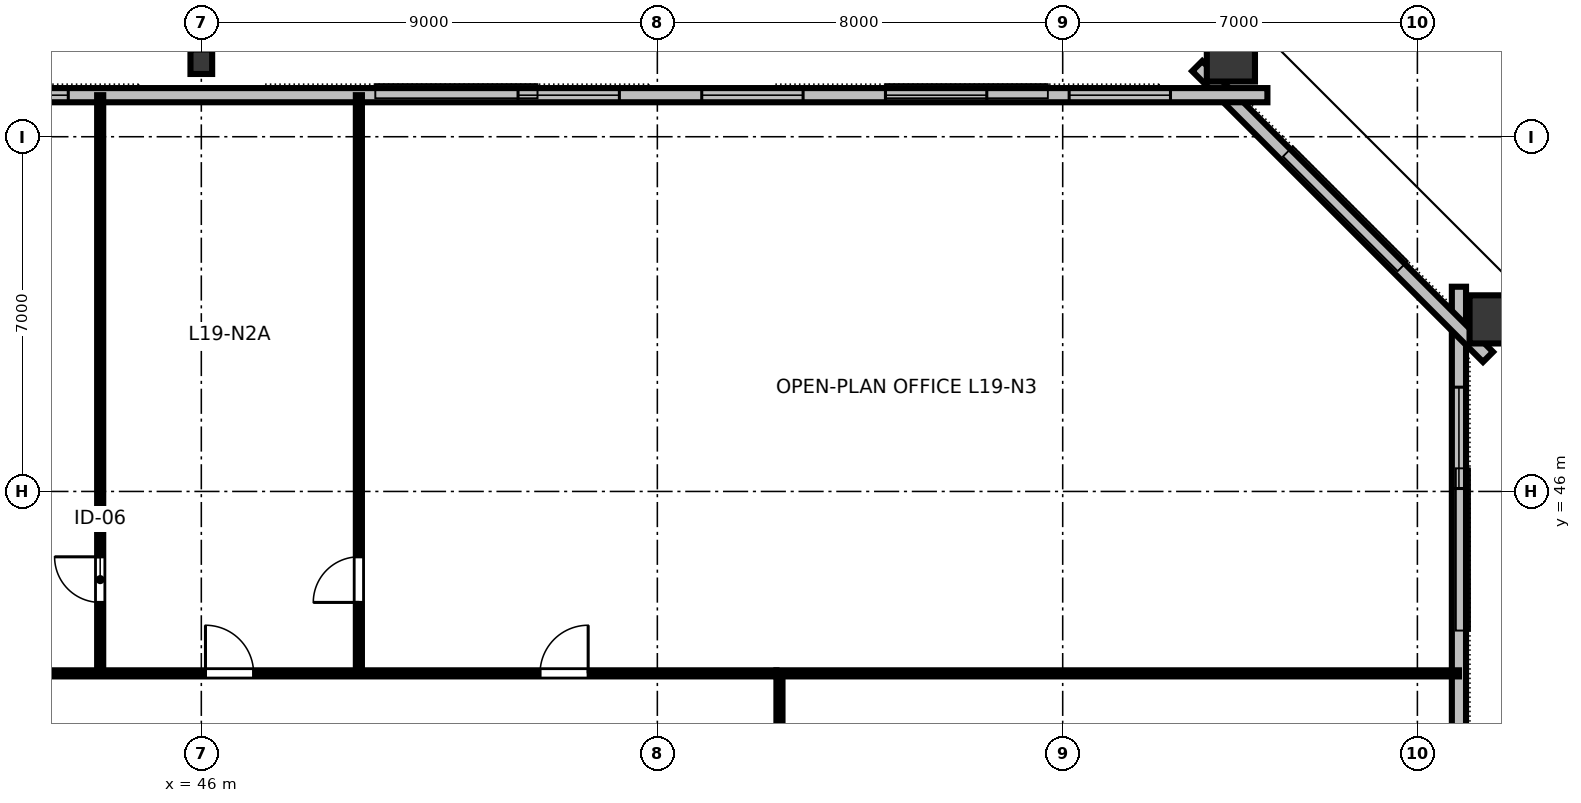
"""IFC4 building model, lengths in metres.
Left out: names, types, materials, properties, quantities, classifications, styles, units other than length and angle.
Written with IfcOpenShell. Run it as: python <this file> out.ifc"""

import sys

from ifc_helpers import new_model, si_unit, direction, frame, frame_2d, origin, origin_2d, place, context, subcontext, project, spatial, rectangle, hollow_rectangle, i_section, extrude, element, fill, save


model = new_model("IFC4")
c1 = context("Model", 3, precision=1e-05, world=origin(), true_north=direction((0.0, 1.0)))
c2 = subcontext(c1, "Body", "Model", "MODEL_VIEW")
j1 = project(units=[si_unit("LENGTHUNIT", "METRE"), si_unit("PLANEANGLEUNIT", "RADIAN")], contexts=[c1])
p1 = place(None, origin())
s1 = spatial("IfcSite", under=j1, at=p1, CompositionType="ELEMENT")
p2 = place(p1, origin())
s2 = spatial("IfcBuilding", under=s1, at=p2, CompositionType="ELEMENT")
p3 = place(p2, frame((0.0, 0.0, 74.8)))
s3 = spatial("IfcBuildingStorey", under=s2, at=p3, CompositionType="ELEMENT", Elevation=74.8)
for number, where, z_axis, x_axis in (
    (1, (71.604, 49.396, 0.0), (0.0, 0.0, 1.0), (0.0, 1.0, 0.0)),
    (2, (66.319, 54.664, 0.0), (0.0, 0.0, 1.0), (1.0, 0.0, 0.0)),
):
    element("IfcColumn", number, at=place(p3, frame(where, z_axis=z_axis, x_axis=x_axis)), inside=s3, PredefinedType="COLUMN", context=c2, shape_type="SweptSolid", body=[
        extrude(hollow_rectangle(XDim=0.95, YDim=1.15, WallThickness=0.06, at=origin_2d()), origin(), (0.0, 0.0, 1.0), 3.358),
    ])
p4 = place(p3, frame((46.0, 54.48, 0.0), z_axis=(0.0, 0.0, 1.0), x_axis=(1.0, 0.0, 0.0)))
e3 = element("IfcColumn", 3, at=p4, inside=s3, PredefinedType="COLUMN", context=c2, shape_type="SweptSolid", body=[
    extrude(i_section(OverallWidth=0.428, OverallDepth=0.483, WebThickness=0.051, FlangeThickness=0.082, FilletRadius=0.025, at=origin_2d()), origin(), (0.0, 0.0, 1.0), 3.358),
])
p5 = place(p3, frame((70.82, 13.96, 0.0), z_axis=(0.0, 0.0, 1.0), x_axis=(0.0, 1.0, 0.0)))
e4 = element("IfcWall", 4, at=p5, inside=s3, PredefinedType="STANDARD", context=c2, shape_type="SweptSolid", body=[
    extrude(rectangle(XDim=36.08, YDim=0.28, at=frame_2d((18.04, 0.0))), origin(), (0.0, 0.0, 1.0), 3.36),
])
p6 = place(p5, frame((1.982, 0.0, 0.8)))
e5 = element("IfcOpeningElement", 5, at=p6, cuts=e4, PredefinedType="OPENING", context=c2, shape_type="SweptSolid", body=[
    extrude(rectangle(XDim=2.0, YDim=1.95, at=frame_2d((1.0, 0.975))), frame((0.0, 0.15, 0.0), z_axis=(0.0, -1.0, 0.0), x_axis=(1.0, 0.0, 0.0)), (0.0, 0.0, 1.0), 0.3),
])
p7 = place(p5, frame((9.511, 0.0, 0.8)))
e6 = element("IfcOpeningElement", 6, at=p7, cuts=e4, PredefinedType="OPENING", context=c2, shape_type="SweptSolid", body=[
    extrude(rectangle(XDim=2.0, YDim=1.95, at=frame_2d((1.0, 0.975))), frame((0.0, 0.15, 0.0), z_axis=(0.0, -1.0, 0.0), x_axis=(1.0, 0.0, 0.0)), (0.0, 0.0, 1.0), 0.3),
])
p8 = place(p5, frame((13.276, 0.0, 0.8)))
e7 = element("IfcOpeningElement", 7, at=p8, cuts=e4, PredefinedType="OPENING", context=c2, shape_type="SweptSolid", body=[
    extrude(rectangle(XDim=2.0, YDim=1.95, at=frame_2d((1.0, 0.975))), frame((0.0, 0.15, 0.0), z_axis=(0.0, -1.0, 0.0), x_axis=(1.0, 0.0, 0.0)), (0.0, 0.0, 1.0), 0.3),
])
p9 = place(p5, frame((20.804, 0.0, 0.8)))
e8 = element("IfcOpeningElement", 8, at=p9, cuts=e4, PredefinedType="OPENING", context=c2, shape_type="SweptSolid", body=[
    extrude(rectangle(XDim=2.0, YDim=1.95, at=frame_2d((1.0, 0.975))), frame((0.0, 0.15, 0.0), z_axis=(0.0, -1.0, 0.0), x_axis=(1.0, 0.0, 0.0)), (0.0, 0.0, 1.0), 0.3),
])
p10 = place(p5, frame((24.569, 0.0, 0.8)))
e9 = element("IfcOpeningElement", 9, at=p10, cuts=e4, PredefinedType="OPENING", context=c2, shape_type="SweptSolid", body=[
    extrude(rectangle(XDim=2.0, YDim=1.95, at=frame_2d((1.0, 0.975))), frame((0.0, 0.15, 0.0), z_axis=(0.0, -1.0, 0.0), x_axis=(1.0, 0.0, 0.0)), (0.0, 0.0, 1.0), 0.3),
])
p11 = place(p5, frame((32.098, 0.0, 0.8)))
e10 = element("IfcOpeningElement", 10, at=p11, cuts=e4, PredefinedType="OPENING", context=c2, shape_type="SweptSolid", body=[
    extrude(rectangle(XDim=2.0, YDim=1.95, at=frame_2d((1.0, 0.975))), frame((0.0, 0.15, 0.0), z_axis=(0.0, -1.0, 0.0), x_axis=(1.0, 0.0, 0.0)), (0.0, 0.0, 1.0), 0.3),
])
p12 = place(p3, frame((71.394, 48.655, 0.0), z_axis=(0.0, 0.0, 1.0), x_axis=(-0.707106781187, 0.707106781187, 0.0)))
e11 = element("IfcWall", 11, at=p12, inside=s3, PredefinedType="STANDARD", context=c2, shape_type="SweptSolid", body=[
    extrude(rectangle(XDim=8.116, YDim=0.28, at=frame_2d((4.058, 0.0))), origin(), (0.0, 0.0, 1.0), 3.36),
])
p13 = place(p3, frame((67.04, 53.82, 0.0), z_axis=(0.0, 0.0, 1.0), x_axis=(-1.0, 0.0, 0.0)))
e12 = element("IfcWall", 12, at=p13, inside=s3, PredefinedType="STANDARD", context=c2, shape_type="SweptSolid", body=[
    extrude(rectangle(XDim=42.08, YDim=0.28, at=frame_2d((21.04, 0.0))), origin(), (0.0, 0.0, 1.0), 3.36),
])
p14 = place(p13, frame((1.913, 0.0, 0.8)))
e13 = element("IfcOpeningElement", 13, at=p14, cuts=e12, PredefinedType="OPENING", context=c2, shape_type="SweptSolid", body=[
    extrude(rectangle(XDim=2.0, YDim=1.95, at=frame_2d((1.0, 0.975))), frame((0.0, 0.15, 0.0), z_axis=(0.0, -1.0, 0.0), x_axis=(1.0, 0.0, 0.0)), (0.0, 0.0, 1.0), 0.3),
])
p15 = place(p13, frame((5.538, 0.0, 0.8)))
e14 = element("IfcOpeningElement", 14, at=p15, cuts=e12, PredefinedType="OPENING", context=c2, shape_type="SweptSolid", body=[
    extrude(rectangle(XDim=2.0, YDim=1.95, at=frame_2d((1.0, 0.975))), frame((0.0, 0.15, 0.0), z_axis=(0.0, -1.0, 0.0), x_axis=(1.0, 0.0, 0.0)), (0.0, 0.0, 1.0), 0.3),
])
p16 = place(p13, frame((9.164, 0.0, 0.8)))
e15 = element("IfcOpeningElement", 15, at=p16, cuts=e12, PredefinedType="OPENING", context=c2, shape_type="SweptSolid", body=[
    extrude(rectangle(XDim=2.0, YDim=1.95, at=frame_2d((1.0, 0.975))), frame((0.0, 0.15, 0.0), z_axis=(0.0, -1.0, 0.0), x_axis=(1.0, 0.0, 0.0)), (0.0, 0.0, 1.0), 0.3),
])
p17 = place(p13, frame((12.789, 0.0, 0.8)))
e16 = element("IfcOpeningElement", 16, at=p17, cuts=e12, PredefinedType="OPENING", context=c2, shape_type="SweptSolid", body=[
    extrude(rectangle(XDim=2.0, YDim=1.95, at=frame_2d((1.0, 0.975))), frame((0.0, 0.15, 0.0), z_axis=(0.0, -1.0, 0.0), x_axis=(1.0, 0.0, 0.0)), (0.0, 0.0, 1.0), 0.3),
])
p18 = place(p13, frame((23.666, 0.0, 0.8)))
e17 = element("IfcOpeningElement", 17, at=p18, cuts=e12, PredefinedType="OPENING", context=c2, shape_type="SweptSolid", body=[
    extrude(rectangle(XDim=2.0, YDim=1.95, at=frame_2d((1.0, 0.975))), frame((0.0, 0.15, 0.0), z_axis=(0.0, -1.0, 0.0), x_axis=(1.0, 0.0, 0.0)), (0.0, 0.0, 1.0), 0.3),
])
p19 = place(p13, frame((27.291, 0.0, 0.8)))
e18 = element("IfcOpeningElement", 18, at=p19, cuts=e12, PredefinedType="OPENING", context=c2, shape_type="SweptSolid", body=[
    extrude(rectangle(XDim=2.0, YDim=1.95, at=frame_2d((1.0, 0.975))), frame((0.0, 0.15, 0.0), z_axis=(0.0, -1.0, 0.0), x_axis=(1.0, 0.0, 0.0)), (0.0, 0.0, 1.0), 0.3),
])
p20 = place(p13, frame((30.917, 0.0, 0.8)))
e19 = element("IfcOpeningElement", 19, at=p20, cuts=e12, PredefinedType="OPENING", context=c2, shape_type="SweptSolid", body=[
    extrude(rectangle(XDim=2.0, YDim=1.95, at=frame_2d((1.0, 0.975))), frame((0.0, 0.15, 0.0), z_axis=(0.0, -1.0, 0.0), x_axis=(1.0, 0.0, 0.0)), (0.0, 0.0, 1.0), 0.3),
])
p21 = place(p13, frame((34.542, 0.0, 0.8)))
e20 = element("IfcOpeningElement", 20, at=p21, cuts=e12, PredefinedType="OPENING", context=c2, shape_type="SweptSolid", body=[
    extrude(rectangle(XDim=2.0, YDim=1.95, at=frame_2d((1.0, 0.975))), frame((0.0, 0.15, 0.0), z_axis=(0.0, -1.0, 0.0), x_axis=(1.0, 0.0, 0.0)), (0.0, 0.0, 1.0), 0.3),
])
p22 = place(p13, frame((38.167, 0.0, 0.8)))
e21 = element("IfcOpeningElement", 21, at=p22, cuts=e12, PredefinedType="OPENING", context=c2, shape_type="SweptSolid", body=[
    extrude(rectangle(XDim=2.0, YDim=1.95, at=frame_2d((1.0, 0.975))), frame((0.0, 0.15, 0.0), z_axis=(0.0, -1.0, 0.0), x_axis=(1.0, 0.0, 0.0)), (0.0, 0.0, 1.0), 0.3),
])
p23 = place(p3, frame((44.004, 42.41, 0.0), z_axis=(0.0, 0.0, 1.0), x_axis=(0.0, 1.0, 0.0)))
e22 = element("IfcWall", 22, at=p23, inside=s3, PredefinedType="PARTITIONING", context=c2, shape_type="SweptSolid", body=[
    extrude(rectangle(XDim=11.41, YDim=0.12, at=frame_2d((5.705, 0.0))), origin(), (0.0, 0.0, 1.0), 2.64),
])
p24 = place(p23, frame((1.4, 0.0, 0.0)))
e23 = element("IfcOpeningElement", 23, at=p24, cuts=e22, PredefinedType="OPENING", context=c2, shape_type="SweptSolid", body=[
    extrude(rectangle(XDim=0.9, YDim=2.15, at=frame_2d((0.45, 1.075))), frame((0.0, 0.07, 0.0), z_axis=(0.0, -1.0, 0.0), x_axis=(1.0, 0.0, 0.0)), (0.0, 0.0, 1.0), 0.14),
])
p25 = place(p3, frame((49.11, 42.41, 0.0), z_axis=(0.0, 0.0, 1.0), x_axis=(0.0, 1.0, 0.0)))
e24 = element("IfcWall", 24, at=p25, inside=s3, PredefinedType="PARTITIONING", context=c2, shape_type="SweptSolid", body=[
    extrude(rectangle(XDim=11.41, YDim=0.12, at=frame_2d((5.705, 0.0))), origin(), (0.0, 0.0, 1.0), 2.64),
])
p26 = place(p25, frame((1.4, 0.0, 0.0)))
e25 = element("IfcOpeningElement", 25, at=p26, cuts=e24, PredefinedType="OPENING", context=c2, shape_type="SweptSolid", body=[
    extrude(rectangle(XDim=0.9, YDim=2.15, at=frame_2d((0.45, 1.075))), frame((0.0, 0.07, 0.0), z_axis=(0.0, -1.0, 0.0), x_axis=(1.0, 0.0, 0.0)), (0.0, 0.0, 1.0), 0.14),
])
p27 = place(p3, frame((34.65, 42.41, 0.0), z_axis=(0.0, 0.0, 1.0), x_axis=(1.0, 0.0, 0.0)))
e26 = element("IfcWall", 26, at=p27, inside=s3, PredefinedType="PARTITIONING", context=c2, shape_type="SweptSolid", body=[
    extrude(rectangle(XDim=22.7, YDim=0.12, at=frame_2d((11.35, 0.0))), origin(), (0.0, 0.0, 1.0), 2.64),
])
p28 = place(p27, frame((4.272, 0.0, 0.0)))
e27 = element("IfcOpeningElement", 27, at=p28, cuts=e26, PredefinedType="OPENING", context=c2, shape_type="SweptSolid", body=[
    extrude(rectangle(XDim=0.95, YDim=2.15, at=frame_2d((0.475, 1.075))), frame((0.0, 0.07, 0.0), z_axis=(0.0, -1.0, 0.0), x_axis=(1.0, 0.0, 0.0)), (0.0, 0.0, 1.0), 0.14),
])
p29 = place(p27, frame((11.432, 0.0, 0.0)))
e28 = element("IfcOpeningElement", 28, at=p29, cuts=e26, PredefinedType="OPENING", context=c2, shape_type="SweptSolid", body=[
    extrude(rectangle(XDim=0.95, YDim=2.15, at=frame_2d((0.475, 1.075))), frame((0.0, 0.07, 0.0), z_axis=(0.0, -1.0, 0.0), x_axis=(1.0, 0.0, 0.0)), (0.0, 0.0, 1.0), 0.14),
])
p30 = place(p27, frame((18.035, 0.0, 0.0)))
e29 = element("IfcOpeningElement", 29, at=p30, cuts=e26, PredefinedType="OPENING", context=c2, shape_type="SweptSolid", body=[
    extrude(rectangle(XDim=0.95, YDim=2.15, at=frame_2d((0.475, 1.075))), frame((0.0, 0.07, 0.0), z_axis=(0.0, -1.0, 0.0), x_axis=(1.0, 0.0, 0.0)), (0.0, 0.0, 1.0), 0.14),
])
p31 = place(p3, frame((57.41, 21.65, 0.0), z_axis=(0.0, 0.0, 1.0), x_axis=(0.0, 1.0, 0.0)))
e30 = element("IfcWall", 30, at=p31, inside=s3, PredefinedType="PARTITIONING", context=c2, shape_type="SweptSolid", body=[
    extrude(rectangle(XDim=20.7, YDim=0.12, at=frame_2d((10.35, 0.0))), origin(), (0.0, 0.0, 1.0), 2.64),
])
p32 = place(p31, frame((4.931, 0.0, 0.0)))
e31 = element("IfcOpeningElement", 31, at=p32, cuts=e30, PredefinedType="OPENING", context=c2, shape_type="SweptSolid", body=[
    extrude(rectangle(XDim=0.95, YDim=2.15, at=frame_2d((0.475, 1.075))), frame((0.0, 0.07, 0.0), z_axis=(0.0, -1.0, 0.0), x_axis=(1.0, 0.0, 0.0)), (0.0, 0.0, 1.0), 0.14),
])
p33 = place(p31, frame((15.081, 0.0, 0.0)))
e32 = element("IfcOpeningElement", 32, at=p33, cuts=e30, PredefinedType="OPENING", context=c2, shape_type="SweptSolid", body=[
    extrude(rectangle(XDim=0.95, YDim=2.15, at=frame_2d((0.475, 1.075))), frame((0.0, 0.07, 0.0), z_axis=(0.0, -1.0, 0.0), x_axis=(1.0, 0.0, 0.0)), (0.0, 0.0, 1.0), 0.14),
])
p34 = place(p3, frame((57.35, 42.41, 0.0), z_axis=(0.0, 0.0, 1.0), x_axis=(1.0, 0.0, 0.0)))
e33 = element("IfcWall", 33, at=p34, inside=s3, PredefinedType="PARTITIONING", context=c2, shape_type="SweptSolid", body=[
    extrude(rectangle(XDim=13.47, YDim=0.12, at=frame_2d((6.735, 0.0))), origin(), (0.0, 0.0, 1.0), 2.64),
])
p35 = place(p11, origin())
e34 = element("IfcWindow", 34, at=p35, inside=s3, PartitioningType="SINGLE_PANEL", PredefinedType="WINDOW", context=c2, shape_type="SweptSolid", body=[
    extrude(rectangle(XDim=2.0, YDim=1.95, at=frame_2d((1.0, 0.975))), frame((0.0, 0.03, 0.0), z_axis=(0.0, -1.0, 0.0), x_axis=(1.0, 0.0, 0.0)), (0.0, 0.0, 1.0), 0.06),
])
fill(e10, e34)
p36 = place(p14, origin())
e35 = element("IfcWindow", 35, at=p36, inside=s3, PartitioningType="SINGLE_PANEL", PredefinedType="WINDOW", context=c2, shape_type="SweptSolid", body=[
    extrude(rectangle(XDim=2.0, YDim=1.95, at=frame_2d((1.0, 0.975))), frame((0.0, 0.03, 0.0), z_axis=(0.0, -1.0, 0.0), x_axis=(1.0, 0.0, 0.0)), (0.0, 0.0, 1.0), 0.06),
])
fill(e13, e35)
p37 = place(p15, origin())
e36 = element("IfcWindow", 36, at=p37, inside=s3, PartitioningType="SINGLE_PANEL", PredefinedType="WINDOW", context=c2, shape_type="SweptSolid", body=[
    extrude(rectangle(XDim=2.0, YDim=1.95, at=frame_2d((1.0, 0.975))), frame((0.0, 0.03, 0.0), z_axis=(0.0, -1.0, 0.0), x_axis=(1.0, 0.0, 0.0)), (0.0, 0.0, 1.0), 0.06),
])
fill(e14, e36)
p38 = place(p16, origin())
e37 = element("IfcWindow", 37, at=p38, inside=s3, PartitioningType="SINGLE_PANEL", PredefinedType="WINDOW", context=c2, shape_type="SweptSolid", body=[
    extrude(rectangle(XDim=2.0, YDim=1.95, at=frame_2d((1.0, 0.975))), frame((0.0, 0.03, 0.0), z_axis=(0.0, -1.0, 0.0), x_axis=(1.0, 0.0, 0.0)), (0.0, 0.0, 1.0), 0.06),
])
fill(e15, e37)
p39 = place(p17, origin())
e38 = element("IfcWindow", 38, at=p39, inside=s3, PartitioningType="SINGLE_PANEL", PredefinedType="WINDOW", context=c2, shape_type="SweptSolid", body=[
    extrude(rectangle(XDim=2.0, YDim=1.95, at=frame_2d((1.0, 0.975))), frame((0.0, 0.03, 0.0), z_axis=(0.0, -1.0, 0.0), x_axis=(1.0, 0.0, 0.0)), (0.0, 0.0, 1.0), 0.06),
])
fill(e16, e38)
p40 = place(p18, origin())
e39 = element("IfcWindow", 39, at=p40, inside=s3, PartitioningType="SINGLE_PANEL", PredefinedType="WINDOW", context=c2, shape_type="SweptSolid", body=[
    extrude(rectangle(XDim=2.0, YDim=1.95, at=frame_2d((1.0, 0.975))), frame((0.0, 0.03, 0.0), z_axis=(0.0, -1.0, 0.0), x_axis=(1.0, 0.0, 0.0)), (0.0, 0.0, 1.0), 0.06),
])
fill(e17, e39)
p41 = place(p24, origin())
e40 = element("IfcDoor", 40, at=p41, inside=s3, OperationType="SINGLE_SWING_RIGHT", PredefinedType="DOOR", context=c2, shape_type="SweptSolid", body=[
    extrude(rectangle(XDim=0.9, YDim=2.15, at=frame_2d((0.45, 1.075))), frame((0.0, 0.025, 0.0), z_axis=(0.0, -1.0, 0.0), x_axis=(1.0, 0.0, 0.0)), (0.0, 0.0, 1.0), 0.05),
])
fill(e23, e40)
p42 = place(p26, origin())
e41 = element("IfcDoor", 41, at=p42, inside=s3, OperationType="SINGLE_SWING_LEFT", PredefinedType="DOOR", context=c2, shape_type="SweptSolid", body=[
    extrude(rectangle(XDim=0.9, YDim=2.15, at=frame_2d((0.45, 1.075))), frame((0.0, 0.025, 0.0), z_axis=(0.0, -1.0, 0.0), x_axis=(1.0, 0.0, 0.0)), (0.0, 0.0, 1.0), 0.05),
])
fill(e25, e41)
p43 = place(p29, origin())
e42 = element("IfcDoor", 42, at=p43, inside=s3, OperationType="SINGLE_SWING_LEFT", PredefinedType="DOOR", context=c2, shape_type="SweptSolid", body=[
    extrude(rectangle(XDim=0.95, YDim=2.15, at=frame_2d((0.475, 1.075))), frame((0.0, 0.025, 0.0), z_axis=(0.0, -1.0, 0.0), x_axis=(1.0, 0.0, 0.0)), (0.0, 0.0, 1.0), 0.05),
])
fill(e28, e42)
p44 = place(p30, origin())
e43 = element("IfcDoor", 43, at=p44, inside=s3, OperationType="SINGLE_SWING_RIGHT", PredefinedType="DOOR", context=c2, shape_type="SweptSolid", body=[
    extrude(rectangle(XDim=0.95, YDim=2.15, at=frame_2d((0.475, 1.075))), frame((0.0, 0.025, 0.0), z_axis=(0.0, -1.0, 0.0), x_axis=(1.0, 0.0, 0.0)), (0.0, 0.0, 1.0), 0.05),
])
fill(e29, e43)
save(model, sys.argv[1])
